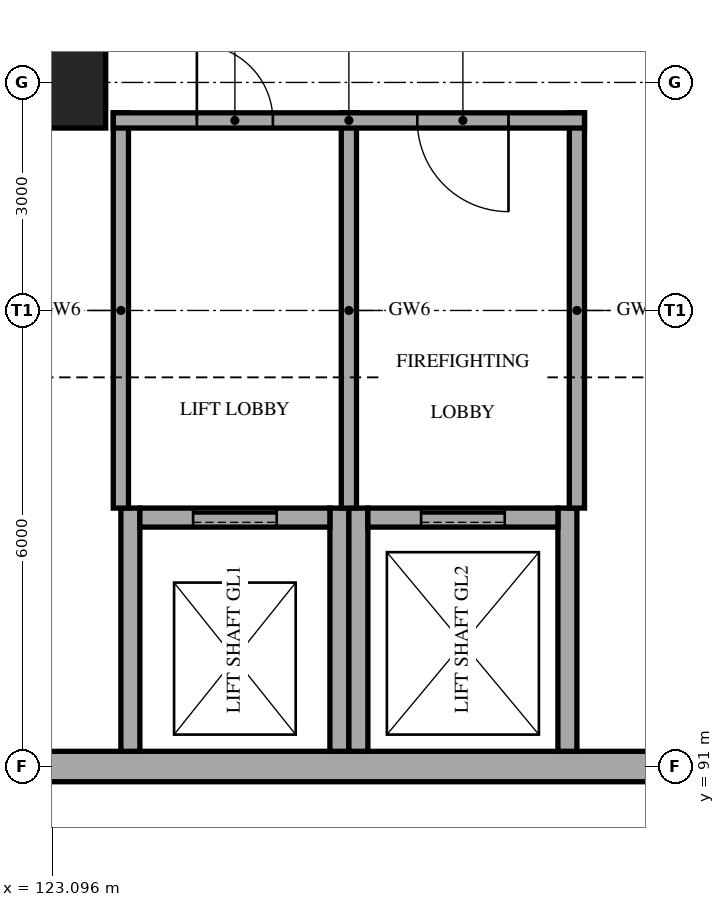
"""IFC4 building model, lengths in metres.
Left out: names, types, materials, properties, quantities, classifications, styles, units other than length and angle.
Written with IfcOpenShell. Run it as: python <this file> out.ifc"""

import sys

from ifc_helpers import new_model, si_unit, direction, frame, frame_2d, origin, origin_2d, place, context, subcontext, project, spatial, rectangle, extrude, element, fill, save


model = new_model("IFC4")
c1 = context("Model", 3, precision=1e-05, world=origin(), true_north=direction((0.0, 1.0)))
c2 = subcontext(c1, "Body", "Model", "MODEL_VIEW")
j1 = project(units=[si_unit("LENGTHUNIT", "METRE"), si_unit("PLANEANGLEUNIT", "RADIAN")], contexts=[c1])
p1 = place(None, origin())
s1 = spatial("IfcSite", under=j1, at=p1, CompositionType="ELEMENT")
p2 = place(p1, origin())
s2 = spatial("IfcBuilding", under=s1, at=p2, CompositionType="ELEMENT")
p3 = place(p2, origin())
s3 = spatial("IfcBuildingStorey", under=s2, at=p3, CompositionType="ELEMENT", Elevation=0.0)
p4 = place(p3, frame((123.0, 100.0, 0.0), z_axis=(0.0, 0.0, 1.0), x_axis=(1.0, 0.0, 0.0)))
e1 = element("IfcColumn", 1, at=p4, inside=s3, PredefinedType="COLUMN", context=c2, shape_type="SweptSolid", body=[
    extrude(rectangle(XDim=1.6, YDim=1.2, at=origin_2d()), origin(), (0.0, 0.0, 1.0), 5.0),
])
p5 = place(p3, frame((107.6, 91.0, 0.0), z_axis=(0.0, 0.0, 1.0), x_axis=(1.0, 0.0, 0.0)))
e2 = element("IfcWall", 2, at=p5, inside=s3, PredefinedType="SHEAR", context=c2, shape_type="SweptSolid", body=[
    extrude(rectangle(XDim=41.6, YDim=0.4, at=frame_2d((20.8, 0.0))), origin(), (0.0, 0.0, 1.0), 5.0),
])
p6 = place(p5, frame((2.5, 0.0, 0.0)))
e3 = element("IfcOpeningElement", 3, at=p6, cuts=e2, PredefinedType="OPENING", context=c2, shape_type="SweptSolid", body=[
    extrude(rectangle(XDim=1.8, YDim=2.1, at=frame_2d((0.9, 1.05))), frame((0.0, 0.21, 0.0), z_axis=(0.0, -1.0, 0.0), x_axis=(1.0, 0.0, 0.0)), (0.0, 0.0, 1.0), 0.42),
])
p7 = place(p5, frame((10.0, 0.0, 0.0)))
e4 = element("IfcOpeningElement", 4, at=p7, cuts=e2, PredefinedType="OPENING", context=c2, shape_type="SweptSolid", body=[
    extrude(rectangle(XDim=1.8, YDim=2.1, at=frame_2d((0.9, 1.05))), frame((0.0, 0.21, 0.0), z_axis=(0.0, -1.0, 0.0), x_axis=(1.0, 0.0, 0.0)), (0.0, 0.0, 1.0), 0.42),
])
p8 = place(p5, frame((35.5, 0.0, 0.0)))
e5 = element("IfcOpeningElement", 5, at=p8, cuts=e2, PredefinedType="OPENING", context=c2, shape_type="SweptSolid", body=[
    extrude(rectangle(XDim=1.8, YDim=2.1, at=frame_2d((0.9, 1.05))), frame((0.0, 0.21, 0.0), z_axis=(0.0, -1.0, 0.0), x_axis=(1.0, 0.0, 0.0)), (0.0, 0.0, 1.0), 0.42),
])
p9 = place(p5, frame((38.5, 0.0, 0.0)))
e6 = element("IfcOpeningElement", 6, at=p9, cuts=e2, PredefinedType="OPENING", context=c2, shape_type="SweptSolid", body=[
    extrude(rectangle(XDim=1.8, YDim=2.1, at=frame_2d((0.9, 1.05))), frame((0.0, 0.21, 0.0), z_axis=(0.0, -1.0, 0.0), x_axis=(1.0, 0.0, 0.0)), (0.0, 0.0, 1.0), 0.42),
])
for number, where, z_axis, x_axis in (
    (7, (124.125, 91.2, 0.0), (0.0, 0.0, 1.0), (0.0, 1.0, 0.0)),
    (8, (126.875, 91.2, 0.0), (0.0, 0.0, 1.0), (0.0, 1.0, 0.0)),
):
    element("IfcWall", number, at=place(p3, frame(where, z_axis=z_axis, x_axis=x_axis)), inside=s3, PredefinedType="SHEAR", context=c2, shape_type="SweptSolid", body=[
        extrude(rectangle(XDim=3.2, YDim=0.25, at=frame_2d((1.6, 0.0))), origin(), (0.0, 0.0, 1.0), 5.0),
    ])
p10 = place(p3, frame((124.25, 94.275, 0.0), z_axis=(0.0, 0.0, 1.0), x_axis=(1.0, 0.0, 0.0)))
e9 = element("IfcWall", 9, at=p10, inside=s3, PredefinedType="SHEAR", context=c2, shape_type="SweptSolid", body=[
    extrude(rectangle(XDim=2.5, YDim=0.25, at=frame_2d((1.25, 0.0))), origin(), (0.0, 0.0, 1.0), 5.0),
])
p11 = place(p10, frame((0.7, 0.0, 0.0)))
e10 = element("IfcOpeningElement", 10, at=p11, cuts=e9, PredefinedType="OPENING", context=c2, shape_type="SweptSolid", body=[
    extrude(rectangle(XDim=1.1, YDim=2.1, at=frame_2d((0.55, 1.05))), frame((0.0, 0.135, 0.0), z_axis=(0.0, -1.0, 0.0), x_axis=(1.0, 0.0, 0.0)), (0.0, 0.0, 1.0), 0.27),
])
for number, where, z_axis, x_axis in (
    (11, (127.125, 91.2, 0.0), (0.0, 0.0, 1.0), (0.0, 1.0, 0.0)),
    (12, (129.875, 91.2, 0.0), (0.0, 0.0, 1.0), (0.0, 1.0, 0.0)),
):
    element("IfcWall", number, at=place(p3, frame(where, z_axis=z_axis, x_axis=x_axis)), inside=s3, PredefinedType="SHEAR", context=c2, shape_type="SweptSolid", body=[
        extrude(rectangle(XDim=3.2, YDim=0.25, at=frame_2d((1.6, 0.0))), origin(), (0.0, 0.0, 1.0), 5.0),
    ])
p12 = place(p3, frame((127.25, 94.275, 0.0), z_axis=(0.0, 0.0, 1.0), x_axis=(1.0, 0.0, 0.0)))
e13 = element("IfcWall", 13, at=p12, inside=s3, PredefinedType="SHEAR", context=c2, shape_type="SweptSolid", body=[
    extrude(rectangle(XDim=2.5, YDim=0.25, at=frame_2d((1.25, 0.0))), origin(), (0.0, 0.0, 1.0), 5.0),
])
p13 = place(p12, frame((0.7, 0.0, 0.0)))
e14 = element("IfcOpeningElement", 14, at=p13, cuts=e13, PredefinedType="OPENING", context=c2, shape_type="SweptSolid", body=[
    extrude(rectangle(XDim=1.1, YDim=2.1, at=frame_2d((0.55, 1.05))), frame((0.0, 0.135, 0.0), z_axis=(0.0, -1.0, 0.0), x_axis=(1.0, 0.0, 0.0)), (0.0, 0.0, 1.0), 0.27),
])
for number, where, z_axis, x_axis in (
    (15, (124.0, 94.4, 0.0), (0.0, 0.0, 1.0), (0.0, 1.0, 0.0)),
    (16, (127.0, 94.4, 0.0), (0.0, 0.0, 1.0), (0.0, 1.0, 0.0)),
    (17, (130.0, 94.4, 0.0), (0.0, 0.0, 1.0), (0.0, 1.0, 0.0)),
):
    element("IfcWall", number, at=place(p3, frame(where, z_axis=z_axis, x_axis=x_axis)), inside=s3, PredefinedType="PARTITIONING", context=c2, shape_type="SweptSolid", body=[
        extrude(rectangle(XDim=5.2, YDim=0.2, at=frame_2d((2.6, 0.0))), origin(), (0.0, 0.0, 1.0), 4.7),
    ])
p14 = place(p3, frame((123.9, 99.5, 0.0), z_axis=(0.0, 0.0, 1.0), x_axis=(1.0, 0.0, 0.0)))
e18 = element("IfcWall", 18, at=p14, inside=s3, PredefinedType="PARTITIONING", context=c2, shape_type="SweptSolid", body=[
    extrude(rectangle(XDim=6.2, YDim=0.2, at=frame_2d((3.1, 0.0))), origin(), (0.0, 0.0, 1.0), 4.7),
])
p15 = place(p14, frame((1.1, 0.0, 0.0)))
e19 = element("IfcOpeningElement", 19, at=p15, cuts=e18, PredefinedType="OPENING", context=c2, shape_type="SweptSolid", body=[
    extrude(rectangle(XDim=1.0, YDim=2.1, at=frame_2d((0.5, 1.05))), frame((0.0, 0.11, 0.0), z_axis=(0.0, -1.0, 0.0), x_axis=(1.0, 0.0, 0.0)), (0.0, 0.0, 1.0), 0.22),
])
p16 = place(p14, frame((4.0, 0.0, 0.0)))
e20 = element("IfcOpeningElement", 20, at=p16, cuts=e18, PredefinedType="OPENING", context=c2, shape_type="SweptSolid", body=[
    extrude(rectangle(XDim=1.2, YDim=2.1, at=frame_2d((0.6, 1.05))), frame((0.0, 0.11, 0.0), z_axis=(0.0, -1.0, 0.0), x_axis=(1.0, 0.0, 0.0)), (0.0, 0.0, 1.0), 0.22),
])
p17 = place(p11, origin())
e21 = element("IfcDoor", 21, at=p17, inside=s3, OperationType="SLIDING_TO_LEFT", PredefinedType="DOOR", context=c2, shape_type="SweptSolid", body=[
    extrude(rectangle(XDim=1.1, YDim=2.1, at=frame_2d((0.55, 1.05))), frame((0.0, 0.025, 0.0), z_axis=(0.0, -1.0, 0.0), x_axis=(1.0, 0.0, 0.0)), (0.0, 0.0, 1.0), 0.05),
])
fill(e10, e21)
p18 = place(p13, origin())
e22 = element("IfcDoor", 22, at=p18, inside=s3, OperationType="SLIDING_TO_LEFT", PredefinedType="DOOR", context=c2, shape_type="SweptSolid", body=[
    extrude(rectangle(XDim=1.1, YDim=2.1, at=frame_2d((0.55, 1.05))), frame((0.0, 0.025, 0.0), z_axis=(0.0, -1.0, 0.0), x_axis=(1.0, 0.0, 0.0)), (0.0, 0.0, 1.0), 0.05),
])
fill(e14, e22)
p19 = place(p15, origin())
e23 = element("IfcDoor", 23, at=p19, inside=s3, OperationType="SINGLE_SWING_LEFT", PredefinedType="DOOR", context=c2, shape_type="SweptSolid", body=[
    extrude(rectangle(XDim=1.0, YDim=2.1, at=frame_2d((0.5, 1.05))), frame((0.0, 0.025, 0.0), z_axis=(0.0, -1.0, 0.0), x_axis=(1.0, 0.0, 0.0)), (0.0, 0.0, 1.0), 0.05),
])
fill(e19, e23)
p20 = place(p16, frame((1.2, 0.0, 0.0), z_axis=(0.0, 0.0, 1.0), x_axis=(-1.0, 0.0, 0.0)))
e24 = element("IfcDoor", 24, at=p20, inside=s3, OperationType="SINGLE_SWING_LEFT", PredefinedType="DOOR", context=c2, shape_type="SweptSolid", body=[
    extrude(rectangle(XDim=1.2, YDim=2.1, at=frame_2d((0.6, 1.05))), frame((0.0, 0.025, 0.0), z_axis=(0.0, -1.0, 0.0), x_axis=(1.0, 0.0, 0.0)), (0.0, 0.0, 1.0), 0.05),
])
fill(e20, e24)
save(model, sys.argv[1])
